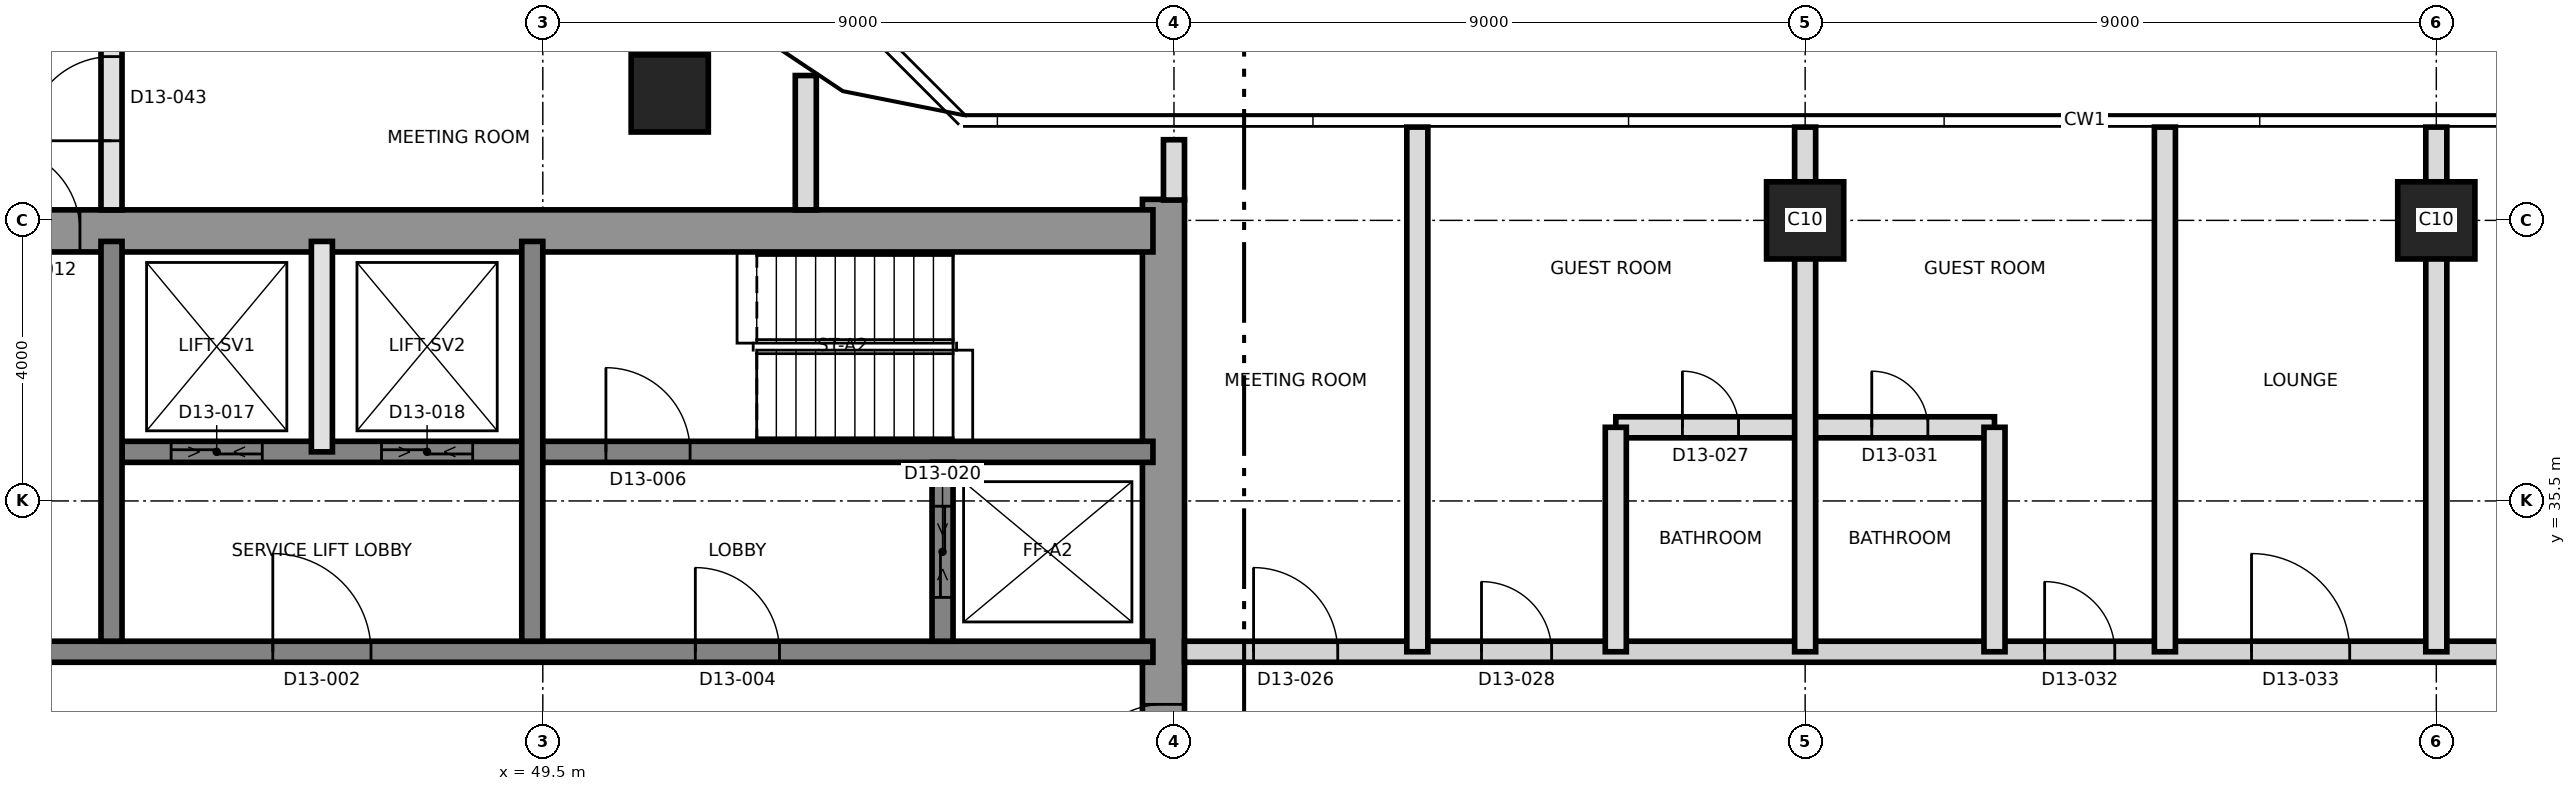
"""IFC4 building model, lengths in metres.
Left out: names, types, materials, properties, quantities, classifications, styles, units other than length and angle.
Written with IfcOpenShell. Run it as: python <this file> out.ifc"""

import sys

from ifc_helpers import new_model, si_unit, direction, frame, frame_2d, origin, origin_2d, place, context, subcontext, project, spatial, rectangle, extrude, element, fill, save


model = new_model("IFC4")
c1 = context("Model", 3, precision=1e-05, world=origin(), true_north=direction((0.0, 1.0)))
c2 = subcontext(c1, "Body", "Model", "MODEL_VIEW")
j1 = project(units=[si_unit("LENGTHUNIT", "METRE"), si_unit("PLANEANGLEUNIT", "RADIAN")], contexts=[c1])
p1 = place(None, origin())
s1 = spatial("IfcSite", under=j1, at=p1, CompositionType="ELEMENT")
p2 = place(p1, origin())
s2 = spatial("IfcBuilding", under=s1, at=p2, CompositionType="ELEMENT")
p3 = place(p2, frame((0.0, 0.0, 142.2)))
s3 = spatial("IfcBuildingStorey", under=s2, at=p3, CompositionType="ELEMENT", Elevation=142.2)
p4 = place(p3, frame((58.35, 21.2, 0.0), z_axis=(0.0, 0.0, 1.0), x_axis=(0.0, 1.0, 0.0)))
e1 = element("IfcWall", 1, at=p4, inside=s3, PredefinedType="SHEAR", context=c2, shape_type="SweptSolid", body=[
    extrude(rectangle(XDim=18.6, YDim=0.6, at=frame_2d((9.3, 0.0))), origin(), (0.0, 0.0, 1.0), 3.7),
])
p5 = place(p4, frame((10.2, 0.0, 0.0)))
e2 = element("IfcOpeningElement", 2, at=p5, cuts=e1, PredefinedType="OPENING", context=c2, shape_type="SweptSolid", body=[
    extrude(rectangle(XDim=1.2, YDim=2.1, at=frame_2d((0.6, 1.05))), frame((0.0, 0.31, 0.0), z_axis=(0.0, -1.0, 0.0), x_axis=(1.0, 0.0, 0.0)), (0.0, 0.0, 1.0), 0.62),
])
p6 = place(p3, frame((31.2, 39.35, 0.0), z_axis=(0.0, 0.0, 1.0), x_axis=(1.0, 0.0, 0.0)))
e3 = element("IfcWall", 3, at=p6, inside=s3, PredefinedType="SHEAR", context=c2, shape_type="SweptSolid", body=[
    extrude(rectangle(XDim=27.0, YDim=0.6, at=frame_2d((13.5, 0.0))), origin(), (0.0, 0.0, 1.0), 3.7),
])
p7 = place(p6, frame((10.5, 0.0, 0.0)))
e4 = element("IfcOpeningElement", 4, at=p7, cuts=e3, PredefinedType="OPENING", context=c2, shape_type="SweptSolid", body=[
    extrude(rectangle(XDim=1.2, YDim=2.1, at=frame_2d((0.6, 1.05))), frame((0.0, 0.31, 0.0), z_axis=(0.0, -1.0, 0.0), x_axis=(1.0, 0.0, 0.0)), (0.0, 0.0, 1.0), 0.62),
])
p8 = place(p3, frame((31.8, 33.35, 0.0), z_axis=(0.0, 0.0, 1.0), x_axis=(1.0, 0.0, 0.0)))
e5 = element("IfcWall", 5, at=p8, inside=s3, PredefinedType="SHEAR", context=c2, shape_type="SweptSolid", body=[
    extrude(rectangle(XDim=26.4, YDim=0.3, at=frame_2d((13.2, 0.0))), origin(), (0.0, 0.0, 1.0), 3.7),
])
p9 = place(p8, frame((13.85, 0.0, 0.0)))
e6 = element("IfcOpeningElement", 6, at=p9, cuts=e5, PredefinedType="OPENING", context=c2, shape_type="SweptSolid", body=[
    extrude(rectangle(XDim=1.4, YDim=2.1, at=frame_2d((0.7, 1.05))), frame((0.0, 0.16, 0.0), z_axis=(0.0, -1.0, 0.0), x_axis=(1.0, 0.0, 0.0)), (0.0, 0.0, 1.0), 0.32),
])
p10 = place(p8, frame((5.325, 0.0, 0.0)))
e7 = element("IfcOpeningElement", 7, at=p10, cuts=e5, PredefinedType="OPENING", context=c2, shape_type="SweptSolid", body=[
    extrude(rectangle(XDim=1.2, YDim=2.1, at=frame_2d((0.6, 1.05))), frame((0.0, 0.16, 0.0), z_axis=(0.0, -1.0, 0.0), x_axis=(1.0, 0.0, 0.0)), (0.0, 0.0, 1.0), 0.32),
])
p11 = place(p8, frame((19.875, 0.0, 0.0)))
e8 = element("IfcOpeningElement", 8, at=p11, cuts=e5, PredefinedType="OPENING", context=c2, shape_type="SweptSolid", body=[
    extrude(rectangle(XDim=1.2, YDim=2.1, at=frame_2d((0.6, 1.05))), frame((0.0, 0.16, 0.0), z_axis=(0.0, -1.0, 0.0), x_axis=(1.0, 0.0, 0.0)), (0.0, 0.0, 1.0), 0.32),
])
p12 = place(p3, frame((43.5, 36.2, 0.0), z_axis=(0.0, 0.0, 1.0), x_axis=(1.0, 0.0, 0.0)))
e9 = element("IfcWall", 9, at=p12, inside=s3, PredefinedType="SHEAR", context=c2, shape_type="SweptSolid", body=[
    extrude(rectangle(XDim=14.7, YDim=0.3, at=frame_2d((7.35, 0.0))), origin(), (0.0, 0.0, 1.0), 3.7),
])
p13 = place(p12, frame((6.9, 0.0, 0.0)))
e10 = element("IfcOpeningElement", 10, at=p13, cuts=e9, PredefinedType="OPENING", context=c2, shape_type="SweptSolid", body=[
    extrude(rectangle(XDim=1.2, YDim=2.1, at=frame_2d((0.6, 1.05))), frame((0.0, 0.16, 0.0), z_axis=(0.0, -1.0, 0.0), x_axis=(1.0, 0.0, 0.0)), (0.0, 0.0, 1.0), 0.32),
])
p14 = place(p12, frame((0.7, 0.0, 0.0)))
e11 = element("IfcOpeningElement", 11, at=p14, cuts=e9, PredefinedType="OPENING", context=c2, shape_type="SweptSolid", body=[
    extrude(rectangle(XDim=1.3, YDim=2.4, at=frame_2d((0.65, 1.2))), frame((0.0, 0.16, 0.0), z_axis=(0.0, -1.0, 0.0), x_axis=(1.0, 0.0, 0.0)), (0.0, 0.0, 1.0), 0.32),
])
p15 = place(p12, frame((3.7, 0.0, 0.0)))
e12 = element("IfcOpeningElement", 12, at=p15, cuts=e9, PredefinedType="OPENING", context=c2, shape_type="SweptSolid", body=[
    extrude(rectangle(XDim=1.3, YDim=2.4, at=frame_2d((0.65, 1.2))), frame((0.0, 0.16, 0.0), z_axis=(0.0, -1.0, 0.0), x_axis=(1.0, 0.0, 0.0)), (0.0, 0.0, 1.0), 0.32),
])
for number, where, z_axis, x_axis in (
    (13, (43.35, 33.5, 0.0), (0.0, 0.0, 1.0), (0.0, 1.0, 0.0)),
    (14, (49.35, 33.5, 0.0), (0.0, 0.0, 1.0), (0.0, 1.0, 0.0)),
):
    element("IfcWall", number, at=place(p3, frame(where, z_axis=z_axis, x_axis=x_axis)), inside=s3, PredefinedType="SHEAR", context=c2, shape_type="SweptSolid", body=[
        extrude(rectangle(XDim=5.7, YDim=0.3, at=frame_2d((2.85, 0.0))), origin(), (0.0, 0.0, 1.0), 3.7),
    ])
p16 = place(p3, frame((55.2, 33.5, 0.0), z_axis=(0.0, 0.0, 1.0), x_axis=(0.0, 1.0, 0.0)))
e15 = element("IfcWall", 15, at=p16, inside=s3, PredefinedType="SHEAR", context=c2, shape_type="SweptSolid", body=[
    extrude(rectangle(XDim=2.55, YDim=0.3, at=frame_2d((1.275, 0.0))), origin(), (0.0, 0.0, 1.0), 3.7),
])
p17 = place(p16, frame((0.625, 0.0, 0.0)))
e16 = element("IfcOpeningElement", 16, at=p17, cuts=e15, PredefinedType="OPENING", context=c2, shape_type="SweptSolid", body=[
    extrude(rectangle(XDim=1.3, YDim=2.4, at=frame_2d((0.65, 1.2))), frame((0.0, 0.16, 0.0), z_axis=(0.0, -1.0, 0.0), x_axis=(1.0, 0.0, 0.0)), (0.0, 0.0, 1.0), 0.32),
])
for number, where, z_axis, x_axis in (
    (17, (67.5, 39.5, 0.0), (0.0, 0.0, 1.0), (1.0, 0.0, 0.0)),
    (18, (76.5, 39.5, 0.0), (0.0, 0.0, 1.0), (1.0, 0.0, 0.0)),
    (19, (51.31, 41.31, 0.0), (0.0, 0.0, 1.0), (1.0, 0.0, 0.0)),
):
    element("IfcColumn", number, at=place(p3, frame(where, z_axis=z_axis, x_axis=x_axis)), inside=s3, PredefinedType="COLUMN", context=c2, shape_type="SweptSolid", body=[
        extrude(rectangle(XDim=1.1, YDim=1.1, at=origin_2d()), origin(), (0.0, 0.0, 1.0), 3.7),
    ])
p18 = place(p3, frame((46.35, 36.2, 0.0), z_axis=(0.0, 0.0, 1.0), x_axis=(0.0, 1.0, 0.0)))
e20 = element("IfcWall", 20, at=p18, inside=s3, PredefinedType="SOLIDWALL", context=c2, shape_type="SweptSolid", body=[
    extrude(rectangle(XDim=3.0, YDim=0.3, at=frame_2d((1.5, 0.0))), origin(), (0.0, 0.0, 1.0), 3.4),
])
p19 = place(p3, frame((58.65, 33.35, 0.0), z_axis=(0.0, 0.0, 1.0), x_axis=(1.0, 0.0, 0.0)))
e21 = element("IfcWall", 21, at=p19, inside=s3, PredefinedType="PARTITIONING", context=c2, shape_type="SweptSolid", body=[
    extrude(rectangle(XDim=26.68, YDim=0.3, at=frame_2d((13.34, 0.0))), origin(), (0.0, 0.0, 1.0), 3.4),
])
p20 = place(p19, frame((0.985, 0.0, 0.0)))
e22 = element("IfcOpeningElement", 22, at=p20, cuts=e21, PredefinedType="OPENING", context=c2, shape_type="SweptSolid", body=[
    extrude(rectangle(XDim=1.2, YDim=2.1, at=frame_2d((0.6, 1.05))), frame((0.0, 0.16, 0.0), z_axis=(0.0, -1.0, 0.0), x_axis=(1.0, 0.0, 0.0)), (0.0, 0.0, 1.0), 0.32),
])
p21 = place(p19, frame((4.235, 0.0, 0.0)))
e23 = element("IfcOpeningElement", 23, at=p21, cuts=e21, PredefinedType="OPENING", context=c2, shape_type="SweptSolid", body=[
    extrude(rectangle(XDim=1.0, YDim=2.1, at=frame_2d((0.5, 1.05))), frame((0.0, 0.16, 0.0), z_axis=(0.0, -1.0, 0.0), x_axis=(1.0, 0.0, 0.0)), (0.0, 0.0, 1.0), 0.32),
])
p22 = place(p19, frame((12.265, 0.0, 0.0)))
e24 = element("IfcOpeningElement", 24, at=p22, cuts=e21, PredefinedType="OPENING", context=c2, shape_type="SweptSolid", body=[
    extrude(rectangle(XDim=1.0, YDim=2.1, at=frame_2d((0.5, 1.05))), frame((0.0, 0.16, 0.0), z_axis=(0.0, -1.0, 0.0), x_axis=(1.0, 0.0, 0.0)), (0.0, 0.0, 1.0), 0.32),
])
p23 = place(p19, frame((15.215, 0.0, 0.0)))
e25 = element("IfcOpeningElement", 25, at=p23, cuts=e21, PredefinedType="OPENING", context=c2, shape_type="SweptSolid", body=[
    extrude(rectangle(XDim=1.4, YDim=2.1, at=frame_2d((0.7, 1.05))), frame((0.0, 0.16, 0.0), z_axis=(0.0, -1.0, 0.0), x_axis=(1.0, 0.0, 0.0)), (0.0, 0.0, 1.0), 0.32),
])
p24 = place(p19, frame((20.2, 0.0, 0.0)))
e26 = element("IfcOpeningElement", 26, at=p24, cuts=e21, PredefinedType="OPENING", context=c2, shape_type="SweptSolid", body=[
    extrude(rectangle(XDim=1.0, YDim=2.4, at=frame_2d((0.5, 1.2))), frame((0.0, 0.16, 0.0), z_axis=(0.0, -1.0, 0.0), x_axis=(1.0, 0.0, 0.0)), (0.0, 0.0, 1.0), 0.32),
])
p25 = place(p3, frame((64.8, 36.55, 0.0), z_axis=(0.0, 0.0, 1.0), x_axis=(1.0, 0.0, 0.0)))
e27 = element("IfcWall", 27, at=p25, inside=s3, PredefinedType="PARTITIONING", context=c2, shape_type="SweptSolid", body=[
    extrude(rectangle(XDim=5.4, YDim=0.3, at=frame_2d((2.7, 0.0))), origin(), (0.0, 0.0, 1.0), 3.4),
])
p26 = place(p25, frame((0.95, 0.0, 0.0)))
e28 = element("IfcOpeningElement", 28, at=p26, cuts=e27, PredefinedType="OPENING", context=c2, shape_type="SweptSolid", body=[
    extrude(rectangle(XDim=0.8, YDim=2.1, at=frame_2d((0.4, 1.05))), frame((0.0, 0.16, 0.0), z_axis=(0.0, -1.0, 0.0), x_axis=(1.0, 0.0, 0.0)), (0.0, 0.0, 1.0), 0.32),
])
p27 = place(p25, frame((3.65, 0.0, 0.0)))
e29 = element("IfcOpeningElement", 29, at=p27, cuts=e27, PredefinedType="OPENING", context=c2, shape_type="SweptSolid", body=[
    extrude(rectangle(XDim=0.8, YDim=2.1, at=frame_2d((0.4, 1.05))), frame((0.0, 0.16, 0.0), z_axis=(0.0, -1.0, 0.0), x_axis=(1.0, 0.0, 0.0)), (0.0, 0.0, 1.0), 0.32),
])
p28 = place(p3, frame((43.35, 39.65, 0.0), z_axis=(0.0, 0.0, 1.0), x_axis=(0.0, 1.0, 0.0)))
e30 = element("IfcWall", 30, at=p28, inside=s3, PredefinedType="SOLIDWALL", context=c2, shape_type="SweptSolid", body=[
    extrude(rectangle(XDim=26.15, YDim=0.3, at=frame_2d((13.075, 0.0))), origin(), (0.0, 0.0, 1.0), 3.4),
])
p29 = place(p28, frame((0.985, 0.0, 0.0)))
e31 = element("IfcOpeningElement", 31, at=p29, cuts=e30, PredefinedType="OPENING", context=c2, shape_type="SweptSolid", body=[
    extrude(rectangle(XDim=1.2, YDim=2.1, at=frame_2d((0.6, 1.05))), frame((0.0, 0.16, 0.0), z_axis=(0.0, -1.0, 0.0), x_axis=(1.0, 0.0, 0.0)), (0.0, 0.0, 1.0), 0.32),
])
p30 = place(p28, frame((4.235, 0.0, 0.0)))
e32 = element("IfcOpeningElement", 32, at=p30, cuts=e30, PredefinedType="OPENING", context=c2, shape_type="SweptSolid", body=[
    extrude(rectangle(XDim=1.0, YDim=2.1, at=frame_2d((0.5, 1.05))), frame((0.0, 0.16, 0.0), z_axis=(0.0, -1.0, 0.0), x_axis=(1.0, 0.0, 0.0)), (0.0, 0.0, 1.0), 0.32),
])
p31 = place(p28, frame((14.5, 0.0, 0.0)))
e33 = element("IfcOpeningElement", 33, at=p31, cuts=e30, PredefinedType="OPENING", context=c2, shape_type="SweptSolid", body=[
    extrude(rectangle(XDim=1.0, YDim=2.4, at=frame_2d((0.5, 1.2))), frame((0.0, 0.16, 0.0), z_axis=(0.0, -1.0, 0.0), x_axis=(1.0, 0.0, 0.0)), (0.0, 0.0, 1.0), 0.32),
])
p32 = place(p28, frame((21.4, 0.0, 0.0)))
e34 = element("IfcOpeningElement", 34, at=p32, cuts=e30, PredefinedType="OPENING", context=c2, shape_type="SweptSolid", body=[
    extrude(rectangle(XDim=1.0, YDim=2.4, at=frame_2d((0.5, 1.2))), frame((0.0, 0.16, 0.0), z_axis=(0.0, -1.0, 0.0), x_axis=(1.0, 0.0, 0.0)), (0.0, 0.0, 1.0), 0.32),
])
p33 = place(p3, frame((53.25, 39.65, 0.0), z_axis=(0.0, 0.0, 1.0), x_axis=(0.0, 1.0, 0.0)))
e35 = element("IfcWall", 35, at=p33, inside=s3, PredefinedType="PARTITIONING", context=c2, shape_type="SweptSolid", body=[
    extrude(rectangle(XDim=1.915, YDim=0.3, at=frame_2d((0.958, 0.0))), origin(), (0.0, 0.0, 1.0), 3.4),
])
p34 = place(p3, frame((58.5, 39.79, 0.0), z_axis=(0.0, 0.0, 1.0), x_axis=(0.0, 1.0, 0.0)))
e36 = element("IfcWall", 36, at=p34, inside=s3, PredefinedType="PARTITIONING", context=c2, shape_type="SweptSolid", body=[
    extrude(rectangle(XDim=0.86, YDim=0.3, at=frame_2d((0.43, 0.0))), origin(), (0.0, 0.0, 1.0), 3.4),
])
p35 = place(p3, frame((61.97, 33.35, 0.0), z_axis=(0.0, 0.0, 1.0), x_axis=(0.0, 1.0, 0.0)))
e37 = element("IfcWall", 37, at=p35, inside=s3, PredefinedType="PARTITIONING", context=c2, shape_type="SweptSolid", body=[
    extrude(rectangle(XDim=7.48, YDim=0.3, at=frame_2d((3.74, 0.0))), origin(), (0.0, 0.0, 1.0), 3.4),
])
p36 = place(p3, frame((64.8, 33.35, 0.0), z_axis=(0.0, 0.0, 1.0), x_axis=(0.0, 1.0, 0.0)))
e38 = element("IfcWall", 38, at=p36, inside=s3, PredefinedType="PARTITIONING", context=c2, shape_type="SweptSolid", body=[
    extrude(rectangle(XDim=3.2, YDim=0.3, at=frame_2d((1.6, 0.0))), origin(), (0.0, 0.0, 1.0), 3.4),
])
p37 = place(p3, frame((67.5, 33.35, 0.0), z_axis=(0.0, 0.0, 1.0), x_axis=(0.0, 1.0, 0.0)))
e39 = element("IfcWall", 39, at=p37, inside=s3, PredefinedType="PARTITIONING", context=c2, shape_type="SweptSolid", body=[
    extrude(rectangle(XDim=7.48, YDim=0.3, at=frame_2d((3.74, 0.0))), origin(), (0.0, 0.0, 1.0), 3.4),
])
p38 = place(p3, frame((70.2, 33.35, 0.0), z_axis=(0.0, 0.0, 1.0), x_axis=(0.0, 1.0, 0.0)))
e40 = element("IfcWall", 40, at=p38, inside=s3, PredefinedType="PARTITIONING", context=c2, shape_type="SweptSolid", body=[
    extrude(rectangle(XDim=3.2, YDim=0.3, at=frame_2d((1.6, 0.0))), origin(), (0.0, 0.0, 1.0), 3.4),
])
for number, where, z_axis, x_axis in (
    (41, (72.63, 33.35, 0.0), (0.0, 0.0, 1.0), (0.0, 1.0, 0.0)),
    (42, (76.5, 33.35, 0.0), (0.0, 0.0, 1.0), (0.0, 1.0, 0.0)),
):
    element("IfcWall", number, at=place(p3, frame(where, z_axis=z_axis, x_axis=x_axis)), inside=s3, PredefinedType="PARTITIONING", context=c2, shape_type="SweptSolid", body=[
        extrude(rectangle(XDim=7.48, YDim=0.3, at=frame_2d((3.74, 0.0))), origin(), (0.0, 0.0, 1.0), 3.4),
    ])
p39 = place(p9, origin())
e43 = element("IfcDoor", 43, at=p39, inside=s3, OperationType="SINGLE_SWING_RIGHT", PredefinedType="DOOR", context=c2, shape_type="SweptSolid", body=[
    extrude(rectangle(XDim=1.4, YDim=2.1, at=frame_2d((0.7, 1.05))), frame((0.0, 0.025, 0.0), z_axis=(0.0, -1.0, 0.0), x_axis=(1.0, 0.0, 0.0)), (0.0, 0.0, 1.0), 0.05),
])
fill(e6, e43)
p40 = place(p11, origin())
e44 = element("IfcDoor", 44, at=p40, inside=s3, OperationType="SINGLE_SWING_RIGHT", PredefinedType="DOOR", context=c2, shape_type="SweptSolid", body=[
    extrude(rectangle(XDim=1.2, YDim=2.1, at=frame_2d((0.6, 1.05))), frame((0.0, 0.025, 0.0), z_axis=(0.0, -1.0, 0.0), x_axis=(1.0, 0.0, 0.0)), (0.0, 0.0, 1.0), 0.05),
])
fill(e8, e44)
p41 = place(p13, origin())
e45 = element("IfcDoor", 45, at=p41, inside=s3, OperationType="SINGLE_SWING_LEFT", PredefinedType="DOOR", context=c2, shape_type="SweptSolid", body=[
    extrude(rectangle(XDim=1.2, YDim=2.1, at=frame_2d((0.6, 1.05))), frame((0.0, 0.025, 0.0), z_axis=(0.0, -1.0, 0.0), x_axis=(1.0, 0.0, 0.0)), (0.0, 0.0, 1.0), 0.05),
])
fill(e10, e45)
p42 = place(p5, origin())
e46 = element("IfcDoor", 46, at=p42, inside=s3, OperationType="SINGLE_SWING_LEFT", PredefinedType="DOOR", context=c2, shape_type="SweptSolid", body=[
    extrude(rectangle(XDim=1.2, YDim=2.1, at=frame_2d((0.6, 1.05))), frame((0.0, 0.025, 0.0), z_axis=(0.0, -1.0, 0.0), x_axis=(1.0, 0.0, 0.0)), (0.0, 0.0, 1.0), 0.05),
])
fill(e2, e46)
p43 = place(p7, origin())
e47 = element("IfcDoor", 47, at=p43, inside=s3, OperationType="SINGLE_SWING_RIGHT", PredefinedType="DOOR", context=c2, shape_type="SweptSolid", body=[
    extrude(rectangle(XDim=1.2, YDim=2.1, at=frame_2d((0.6, 1.05))), frame((0.0, 0.025, 0.0), z_axis=(0.0, -1.0, 0.0), x_axis=(1.0, 0.0, 0.0)), (0.0, 0.0, 1.0), 0.05),
])
fill(e4, e47)
p44 = place(p14, origin())
e48 = element("IfcDoor", 48, at=p44, inside=s3, OperationType="SLIDING_TO_LEFT", PredefinedType="DOOR", context=c2, shape_type="SweptSolid", body=[
    extrude(rectangle(XDim=1.3, YDim=2.4, at=frame_2d((0.65, 1.2))), frame((0.0, 0.025, 0.0), z_axis=(0.0, -1.0, 0.0), x_axis=(1.0, 0.0, 0.0)), (0.0, 0.0, 1.0), 0.05),
])
fill(e11, e48)
p45 = place(p15, origin())
e49 = element("IfcDoor", 49, at=p45, inside=s3, OperationType="SLIDING_TO_LEFT", PredefinedType="DOOR", context=c2, shape_type="SweptSolid", body=[
    extrude(rectangle(XDim=1.3, YDim=2.4, at=frame_2d((0.65, 1.2))), frame((0.0, 0.025, 0.0), z_axis=(0.0, -1.0, 0.0), x_axis=(1.0, 0.0, 0.0)), (0.0, 0.0, 1.0), 0.05),
])
fill(e12, e49)
p46 = place(p17, origin())
e50 = element("IfcDoor", 50, at=p46, inside=s3, OperationType="SLIDING_TO_LEFT", PredefinedType="DOOR", context=c2, shape_type="SweptSolid", body=[
    extrude(rectangle(XDim=1.3, YDim=2.4, at=frame_2d((0.65, 1.2))), frame((0.0, 0.025, 0.0), z_axis=(0.0, -1.0, 0.0), x_axis=(1.0, 0.0, 0.0)), (0.0, 0.0, 1.0), 0.05),
])
fill(e16, e50)
p47 = place(p20, origin())
e51 = element("IfcDoor", 51, at=p47, inside=s3, OperationType="SINGLE_SWING_LEFT", PredefinedType="DOOR", context=c2, shape_type="SweptSolid", body=[
    extrude(rectangle(XDim=1.2, YDim=2.1, at=frame_2d((0.6, 1.05))), frame((0.0, 0.025, 0.0), z_axis=(0.0, -1.0, 0.0), x_axis=(1.0, 0.0, 0.0)), (0.0, 0.0, 1.0), 0.05),
])
fill(e22, e51)
p48 = place(p26, origin())
e52 = element("IfcDoor", 52, at=p48, inside=s3, OperationType="SINGLE_SWING_RIGHT", PredefinedType="DOOR", context=c2, shape_type="SweptSolid", body=[
    extrude(rectangle(XDim=0.8, YDim=2.1, at=frame_2d((0.4, 1.05))), frame((0.0, 0.025, 0.0), z_axis=(0.0, -1.0, 0.0), x_axis=(1.0, 0.0, 0.0)), (0.0, 0.0, 1.0), 0.05),
])
fill(e28, e52)
p49 = place(p21, origin())
e53 = element("IfcDoor", 53, at=p49, inside=s3, OperationType="SINGLE_SWING_LEFT", PredefinedType="DOOR", context=c2, shape_type="SweptSolid", body=[
    extrude(rectangle(XDim=1.0, YDim=2.1, at=frame_2d((0.5, 1.05))), frame((0.0, 0.025, 0.0), z_axis=(0.0, -1.0, 0.0), x_axis=(1.0, 0.0, 0.0)), (0.0, 0.0, 1.0), 0.05),
])
fill(e23, e53)
p50 = place(p27, origin())
e54 = element("IfcDoor", 54, at=p50, inside=s3, OperationType="SINGLE_SWING_LEFT", PredefinedType="DOOR", context=c2, shape_type="SweptSolid", body=[
    extrude(rectangle(XDim=0.8, YDim=2.1, at=frame_2d((0.4, 1.05))), frame((0.0, 0.025, 0.0), z_axis=(0.0, -1.0, 0.0), x_axis=(1.0, 0.0, 0.0)), (0.0, 0.0, 1.0), 0.05),
])
fill(e29, e54)
p51 = place(p22, origin())
e55 = element("IfcDoor", 55, at=p51, inside=s3, OperationType="SINGLE_SWING_RIGHT", PredefinedType="DOOR", context=c2, shape_type="SweptSolid", body=[
    extrude(rectangle(XDim=1.0, YDim=2.1, at=frame_2d((0.5, 1.05))), frame((0.0, 0.025, 0.0), z_axis=(0.0, -1.0, 0.0), x_axis=(1.0, 0.0, 0.0)), (0.0, 0.0, 1.0), 0.05),
])
fill(e24, e55)
p52 = place(p23, origin())
e56 = element("IfcDoor", 56, at=p52, inside=s3, OperationType="SINGLE_SWING_LEFT", PredefinedType="DOOR", context=c2, shape_type="SweptSolid", body=[
    extrude(rectangle(XDim=1.4, YDim=2.1, at=frame_2d((0.7, 1.05))), frame((0.0, 0.025, 0.0), z_axis=(0.0, -1.0, 0.0), x_axis=(1.0, 0.0, 0.0)), (0.0, 0.0, 1.0), 0.05),
])
fill(e25, e56)
p53 = place(p29, origin())
e57 = element("IfcDoor", 57, at=p53, inside=s3, OperationType="SINGLE_SWING_RIGHT", PredefinedType="DOOR", context=c2, shape_type="SweptSolid", body=[
    extrude(rectangle(XDim=1.2, YDim=2.1, at=frame_2d((0.6, 1.05))), frame((0.0, 0.025, 0.0), z_axis=(0.0, -1.0, 0.0), x_axis=(1.0, 0.0, 0.0)), (0.0, 0.0, 1.0), 0.05),
])
fill(e31, e57)
save(model, sys.argv[1])
